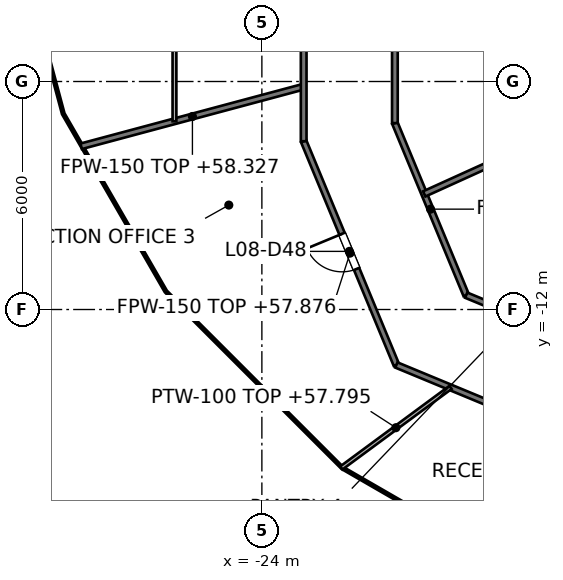
"""IFC4 building model, lengths in metres.
Left out: names, types, materials, properties, quantities, classifications, styles, units other than length and angle.
Written with IfcOpenShell. Run it as: python <this file> out.ifc"""

import sys

from ifc_helpers import new_model, si_unit, direction, frame, frame_2d, origin, place, context, subcontext, project, spatial, rectangle, extrude, element, fill, save


model = new_model("IFC4")
c1 = context("Model", 3, precision=1e-05, world=origin(), true_north=direction((0.0, 1.0)))
c2 = subcontext(c1, "Body", "Model", "MODEL_VIEW")
j1 = project(units=[si_unit("LENGTHUNIT", "METRE"), si_unit("PLANEANGLEUNIT", "RADIAN")], contexts=[c1])
p1 = place(None, origin())
s1 = spatial("IfcSite", under=j1, at=p1, CompositionType="ELEMENT")
p2 = place(p1, origin())
s2 = spatial("IfcBuilding", under=s1, at=p2, CompositionType="ELEMENT")
p3 = place(p2, frame((0.0, 0.0, 54.6)))
s3 = spatial("IfcBuildingStorey", under=s2, at=p3, CompositionType="ELEMENT", Elevation=54.6)
p4 = place(p3, frame((-22.9, -7.572, 0.0), z_axis=(0.0, 0.0, 1.0), x_axis=(0.382860357704, -0.923806227788, 0.0)))
e1 = element("IfcWall", 1, at=p4, inside=s3, PredefinedType="PARTITIONING", context=c2, shape_type="SweptSolid", body=[
    extrude(rectangle(XDim=6.374, YDim=0.15, at=frame_2d((3.187, 0.0))), origin(), (0.0, 0.0, 1.0), 3.276),
])
p5 = place(p4, frame((2.637, 0.0, 0.0)))
e2 = element("IfcOpeningElement", 2, at=p5, cuts=e1, PredefinedType="OPENING", context=c2, shape_type="SweptSolid", body=[
    extrude(rectangle(XDim=1.0, YDim=2.1, at=frame_2d((0.5, 1.05))), frame((0.0, 0.075, 0.0), z_axis=(0.0, -1.0, 0.0), x_axis=(1.0, 0.0, 0.0)), (0.0, 0.0, 1.0), 0.15),
])
p6 = place(p3, frame((-20.5, -7.095, 0.0), z_axis=(0.0, 0.0, 1.0), x_axis=(0.382878184095, -0.923798839653, 0.0)))
e3 = element("IfcWall", 3, at=p6, inside=s3, PredefinedType="PARTITIONING", context=c2, shape_type="SweptSolid", body=[
    extrude(rectangle(XDim=4.902, YDim=0.15, at=frame_2d((2.451, 0.0))), origin(), (0.0, 0.0, 1.0), 3.276),
])
p7 = place(p3, frame((-20.46, -13.46, 0.0), z_axis=(0.0, 0.0, 1.0), x_axis=(0.9237825057, -0.382917591869, 0.0)))
e4 = element("IfcWall", 4, at=p7, inside=s3, PredefinedType="PARTITIONING", context=c2, shape_type="SweptSolid", body=[
    extrude(rectangle(XDim=6.415, YDim=0.15, at=frame_2d((3.208, 0.0))), origin(), (0.0, 0.0, 1.0), 3.195),
])
p8 = place(p3, frame((-18.623, -11.623, 0.0), z_axis=(0.0, 0.0, 1.0), x_axis=(0.923791670587, -0.38289548098, 0.0)))
e5 = element("IfcWall", 5, at=p8, inside=s3, PredefinedType="PARTITIONING", context=c2, shape_type="SweptSolid", body=[
    extrude(rectangle(XDim=4.931, YDim=0.15, at=frame_2d((2.465, 0.0))), origin(), (0.0, 0.0, 1.0), 3.195),
])
p9 = place(p3, frame((-28.755, -7.705, 0.0), z_axis=(0.0, 0.0, 1.0), x_axis=(0.965915328716, 0.2588582194, 0.0)))
e6 = element("IfcWall", 6, at=p9, inside=s3, PredefinedType="PARTITIONING", context=c2, shape_type="SweptSolid", body=[
    extrude(rectangle(XDim=6.062, YDim=0.15, at=frame_2d((3.031, 0.0))), origin(), (0.0, 0.0, 1.0), 3.727),
])
p10 = place(p3, frame((-19.728, -8.958, 0.0), z_axis=(0.0, 0.0, 1.0), x_axis=(0.910629511797, 0.413223779863, 0.0)))
e7 = element("IfcWall", 7, at=p10, inside=s3, PredefinedType="PARTITIONING", context=c2, shape_type="SweptSolid", body=[
    extrude(rectangle(XDim=5.368, YDim=0.15, at=frame_2d((2.684, 0.0))), origin(), (0.0, 0.0, 1.0), 4.05),
])
p11 = place(p3, frame((-20.5, -7.095, 0.0), z_axis=(0.0, 0.0, 1.0), x_axis=(0.0, 1.0, 0.0)))
e8 = element("IfcWall", 8, at=p11, inside=s3, PredefinedType="PARTITIONING", context=c2, shape_type="SweptSolid", body=[
    extrude(rectangle(XDim=14.569, YDim=0.15, at=frame_2d((7.285, 0.0))), origin(), (0.0, 0.0, 1.0), 3.127),
])
p12 = place(p11, frame((10.234, 0.0, 0.0)))
e9 = element("IfcOpeningElement", 9, at=p12, cuts=e8, PredefinedType="OPENING", context=c2, shape_type="SweptSolid", body=[
    extrude(rectangle(XDim=1.0, YDim=2.1, at=frame_2d((0.5, 1.05))), frame((0.0, 0.075, 0.0), z_axis=(0.0, -1.0, 0.0), x_axis=(1.0, 0.0, 0.0)), (0.0, 0.0, 1.0), 0.15),
])
p13 = place(p11, frame((3.0, 0.0, 0.0)))
e10 = element("IfcOpeningElement", 10, at=p13, cuts=e8, PredefinedType="OPENING", context=c2, shape_type="SweptSolid", body=[
    extrude(rectangle(XDim=1.0, YDim=2.1, at=frame_2d((0.5, 1.05))), frame((0.0, 0.075, 0.0), z_axis=(0.0, -1.0, 0.0), x_axis=(1.0, 0.0, 0.0)), (0.0, 0.0, 1.0), 0.15),
])
p14 = place(p3, frame((-22.9, -7.572, 0.0), z_axis=(0.0, 0.0, 1.0), x_axis=(0.0, 1.0, 0.0)))
e11 = element("IfcWall", 11, at=p14, inside=s3, PredefinedType="PARTITIONING", context=c2, shape_type="SweptSolid", body=[
    extrude(rectangle(XDim=15.689, YDim=0.15, at=frame_2d((7.844, 0.0))), origin(), (0.0, 0.0, 1.0), 3.127),
])
p15 = place(p14, frame((8.062, 0.0, 0.0)))
e12 = element("IfcOpeningElement", 12, at=p15, cuts=e11, PredefinedType="OPENING", context=c2, shape_type="SweptSolid", body=[
    extrude(rectangle(XDim=1.0, YDim=2.1, at=frame_2d((0.5, 1.05))), frame((0.0, 0.075, 0.0), z_axis=(0.0, -1.0, 0.0), x_axis=(1.0, 0.0, 0.0)), (0.0, 0.0, 1.0), 0.15),
])
p16 = place(p3, frame((-21.91, -16.17, 0.0), z_axis=(0.0, 0.0, 1.0), x_axis=(0.804644864384, 0.593756382888, 0.0)))
e13 = element("IfcWall", 13, at=p16, inside=s3, PredefinedType="PARTITIONING", context=c2, shape_type="SweptSolid", body=[
    extrude(rectangle(XDim=3.57, YDim=0.1, at=frame_2d((1.785, 0.0))), origin(), (0.0, 0.0, 1.0), 3.195),
])
p17 = place(p3, frame((-26.3, -7.047, 0.0), z_axis=(0.0, 0.0, 1.0), x_axis=(0.0, 1.0, 0.0)))
e14 = element("IfcWall", 14, at=p17, inside=s3, PredefinedType="PARTITIONING", context=c2, shape_type="SweptSolid", body=[
    extrude(rectangle(XDim=16.075, YDim=0.1, at=frame_2d((8.038, 0.0))), origin(), (0.0, 0.0, 1.0), 3.127),
])
p18 = place(p17, frame((7.537, 0.0, 0.0)))
e15 = element("IfcOpeningElement", 15, at=p18, cuts=e14, PredefinedType="OPENING", context=c2, shape_type="SweptSolid", body=[
    extrude(rectangle(XDim=0.9, YDim=2.1, at=frame_2d((0.45, 1.05))), frame((0.0, 0.05, 0.0), z_axis=(0.0, -1.0, 0.0), x_axis=(1.0, 0.0, 0.0)), (0.0, 0.0, 1.0), 0.1),
])
p19 = place(p5, origin())
e16 = element("IfcDoor", 16, at=p19, inside=s3, OperationType="SINGLE_SWING_LEFT", PredefinedType="DOOR", context=c2, shape_type="SweptSolid", body=[
    extrude(rectangle(XDim=1.0, YDim=2.1, at=frame_2d((0.5, 1.05))), frame((0.0, 0.025, 0.0), z_axis=(0.0, -1.0, 0.0), x_axis=(1.0, 0.0, 0.0)), (0.0, 0.0, 1.0), 0.05),
])
fill(e2, e16)
save(model, sys.argv[1])
